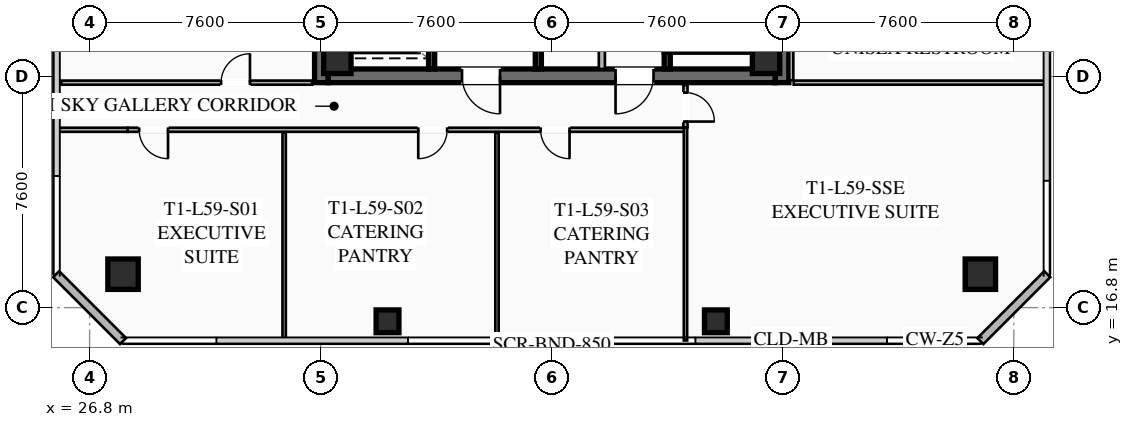
"""IFC4 building model, lengths in metres.
Left out: names, types, materials, properties, quantities, classifications, styles, units other than length and angle.
Written with IfcOpenShell. Run it as: python <this file> out.ifc"""

import sys

from ifc_helpers import new_model, si_unit, direction, frame, frame_2d, origin, origin_2d, place, context, subcontext, project, spatial, rectangle, hollow_rectangle, extrude, element, fill, save


model = new_model("IFC4")
c1 = context("Model", 3, precision=1e-05, world=origin(), true_north=direction((0.0, 1.0)))
c2 = subcontext(c1, "Body", "Model", "MODEL_VIEW")
j1 = project(units=[si_unit("LENGTHUNIT", "METRE"), si_unit("PLANEANGLEUNIT", "RADIAN")], contexts=[c1])
p1 = place(None, origin())
s1 = spatial("IfcSite", under=j1, at=p1, CompositionType="ELEMENT")
p2 = place(p1, origin())
s2 = spatial("IfcBuilding", under=s1, at=p2, CompositionType="ELEMENT")
p3 = place(p2, frame((0.0, 0.0, 218.4)))
s3 = spatial("IfcBuildingStorey", under=s2, at=p3, CompositionType="ELEMENT", Elevation=218.4)
for number, where, z_axis, x_axis in (
    (1, (34.425, 24.2, 0.0), (0.0, 0.0, 1.0), (0.0, 1.0, 0.0)),
    (2, (49.575, 39.8, 0.0), (0.0, 0.0, 1.0), (0.0, -1.0, 0.0)),
):
    element("IfcWall", number, at=place(p3, frame(where, z_axis=z_axis, x_axis=x_axis)), inside=s3, PredefinedType="SHEAR", context=c2, shape_type="SweptSolid", body=[
        extrude(rectangle(XDim=15.6, YDim=0.45, at=frame_2d((7.8, 0.0))), origin(), (0.0, 0.0, 1.0), 3.55),
    ])
p4 = place(p3, frame((49.35, 24.425, 0.0), z_axis=(0.0, 0.0, 1.0), x_axis=(-1.0, 0.0, 0.0)))
e3 = element("IfcWall", 3, at=p4, inside=s3, PredefinedType="SHEAR", context=c2, shape_type="SweptSolid", body=[
    extrude(rectangle(XDim=14.7, YDim=0.45, at=frame_2d((7.35, 0.0))), origin(), (0.0, 0.0, 1.0), 3.55),
])
p5 = place(p4, frame((9.05, 0.0, 0.0)))
e4 = element("IfcOpeningElement", 4, at=p5, cuts=e3, PredefinedType="OPENING", context=c2, shape_type="SweptSolid", body=[
    extrude(rectangle(XDim=1.25, YDim=2.25, at=frame_2d((0.625, 1.125))), frame((0.0, 0.235, 0.0), z_axis=(0.0, -1.0, 0.0), x_axis=(1.0, 0.0, 0.0)), (0.0, 0.0, 1.0), 0.47),
])
p6 = place(p4, frame((4.0, 0.0, 0.0)))
e5 = element("IfcOpeningElement", 5, at=p6, cuts=e3, PredefinedType="OPENING", context=c2, shape_type="SweptSolid", body=[
    extrude(rectangle(XDim=1.25, YDim=2.25, at=frame_2d((0.625, 1.125))), frame((0.0, 0.235, 0.0), z_axis=(0.0, -1.0, 0.0), x_axis=(1.0, 0.0, 0.0)), (0.0, 0.0, 1.0), 0.47),
])
for number, where, z_axis, x_axis in (
    (6, (34.95, 24.95, 0.0), (0.0, 0.0, 1.0), (1.0, 0.0, 0.0)),
    (7, (49.05, 24.95, 0.0), (0.0, 0.0, 1.0), (1.0, 0.0, 0.0)),
):
    element("IfcColumn", number, at=place(p3, frame(where, z_axis=z_axis, x_axis=x_axis)), inside=s3, PredefinedType="COLUMN", context=c2, shape_type="SweptSolid", body=[
        extrude(hollow_rectangle(XDim=0.9, YDim=0.9, WallThickness=0.04, at=origin_2d()), origin(), (0.0, 0.0, 1.0), 3.37),
    ])
for number, where, z_axis, x_axis in (
    (8, (27.9, 17.9, 0.0), (0.0, 0.0, 1.0), (1.0, 0.0, 0.0)),
    (9, (56.1, 17.9, 0.0), (0.0, 0.0, 1.0), (1.0, 0.0, 0.0)),
):
    element("IfcColumn", number, at=place(p3, frame(where, z_axis=z_axis, x_axis=x_axis)), inside=s3, PredefinedType="COLUMN", context=c2, shape_type="SweptSolid", body=[
        extrude(hollow_rectangle(XDim=1.0, YDim=1.0, WallThickness=0.04, at=origin_2d()), origin(), (0.0, 0.0, 1.0), 3.37),
    ])
for number, where, z_axis, x_axis in (
    (10, (36.6, 16.35, 0.0), (0.0, 0.0, 1.0), (1.0, 0.0, 0.0)),
    (11, (47.4, 16.35, 0.0), (0.0, 0.0, 1.0), (1.0, 0.0, 0.0)),
):
    element("IfcColumn", number, at=place(p3, frame(where, z_axis=z_axis, x_axis=x_axis)), inside=s3, PredefinedType="COLUMN", context=c2, shape_type="SweptSolid", body=[
        extrude(hollow_rectangle(XDim=0.75, YDim=0.75, WallThickness=0.032, at=origin_2d()), origin(), (0.0, 0.0, 1.0), 3.37),
    ])
for number, where, z_axis, x_axis in (
    (12, (27.9, 15.7, 0.0), (0.0, 0.0, 1.0), (-0.707, 0.707, 0.0)),
    (13, (58.3, 17.9, 0.0), (0.0, 0.0, 1.0), (-0.707, -0.707, 0.0)),
):
    element("IfcWall", number, at=place(p3, frame(where, z_axis=z_axis, x_axis=x_axis)), inside=s3, PredefinedType="SOLIDWALL", context=c2, shape_type="SweptSolid", body=[
        extrude(rectangle(XDim=3.111, YDim=0.28, at=frame_2d((1.556, 0.0))), origin(), (0.0, 0.0, 1.0), 3.37),
    ])
p7 = place(p3, frame((45.8, 32.8, 0.0), z_axis=(0.0, 0.0, 1.0), x_axis=(0.0, -1.0, 0.0)))
e14 = element("IfcWall", 14, at=p7, inside=s3, PredefinedType="SHEAR", context=c2, shape_type="SweptSolid", body=[
    extrude(rectangle(XDim=8.15, YDim=0.2, at=frame_2d((4.075, 0.0))), origin(), (0.0, 0.0, 1.0), 3.37),
])
p8 = place(p7, frame((0.45, 0.0, 0.0)))
e15 = element("IfcOpeningElement", 15, at=p8, cuts=e14, PredefinedType="OPENING", context=c2, shape_type="SweptSolid", body=[
    extrude(rectangle(XDim=1.15, YDim=2.2, at=frame_2d((0.575, 1.1))), frame((0.0, 0.11, 0.0), z_axis=(0.0, -1.0, 0.0), x_axis=(1.0, 0.0, 0.0)), (0.0, 0.0, 1.0), 0.22),
])
p9 = place(p3, frame((41.56, 24.65, 0.0), z_axis=(0.0, 0.0, 1.0), x_axis=(0.0, 1.0, 0.0)))
e16 = element("IfcWall", 16, at=p9, inside=s3, PredefinedType="SHEAR", context=c2, shape_type="SweptSolid", body=[
    extrude(rectangle(XDim=14.7, YDim=0.2, at=frame_2d((7.35, 0.0))), origin(), (0.0, 0.0, 1.0), 3.37),
])
p10 = place(p3, frame((38.05, 24.65, 0.0), z_axis=(0.0, 0.0, 1.0), x_axis=(0.0, 1.0, 0.0)))
e17 = element("IfcWall", 17, at=p10, inside=s3, PredefinedType="SHEAR", context=c2, shape_type="SweptSolid", body=[
    extrude(rectangle(XDim=6.55, YDim=0.2, at=frame_2d((3.275, 0.0))), origin(), (0.0, 0.0, 1.0), 3.37),
])
p11 = place(p10, frame((4.975, 0.0, 0.0)))
e18 = element("IfcOpeningElement", 18, at=p11, cuts=e17, PredefinedType="OPENING", context=c2, shape_type="SweptSolid", body=[
    extrude(rectangle(XDim=1.3, YDim=2.25, at=frame_2d((0.65, 1.125))), frame((0.0, 0.11, 0.0), z_axis=(0.0, -1.0, 0.0), x_axis=(1.0, 0.0, 0.0)), (0.0, 0.0, 1.0), 0.22),
])
p12 = place(p10, frame((2.975, 0.0, 0.0)))
e19 = element("IfcOpeningElement", 19, at=p12, cuts=e17, PredefinedType="OPENING", context=c2, shape_type="SweptSolid", body=[
    extrude(rectangle(XDim=1.3, YDim=2.25, at=frame_2d((0.65, 1.125))), frame((0.0, 0.11, 0.0), z_axis=(0.0, -1.0, 0.0), x_axis=(1.0, 0.0, 0.0)), (0.0, 0.0, 1.0), 0.22),
])
p13 = place(p10, frame((0.775, 0.0, 0.0)))
e20 = element("IfcOpeningElement", 20, at=p13, cuts=e17, PredefinedType="OPENING", context=c2, shape_type="SweptSolid", body=[
    extrude(rectangle(XDim=1.3, YDim=2.25, at=frame_2d((0.65, 1.125))), frame((0.0, 0.11, 0.0), z_axis=(0.0, -1.0, 0.0), x_axis=(1.0, 0.0, 0.0)), (0.0, 0.0, 1.0), 0.22),
])
p14 = place(p3, frame((43.65, 24.65, 0.0), z_axis=(0.0, 0.0, 1.0), x_axis=(0.0, 1.0, 0.0)))
e21 = element("IfcWall", 21, at=p14, inside=s3, PredefinedType="SOLIDWALL", context=c2, shape_type="SweptSolid", body=[
    extrude(rectangle(XDim=7.0, YDim=0.2, at=frame_2d((3.5, 0.0))), origin(), (0.0, 0.0, 1.0), 2.723),
])
p15 = place(p14, frame((0.85, 0.0, 0.0)))
e22 = element("IfcOpeningElement", 22, at=p15, cuts=e21, PredefinedType="OPENING", context=c2, shape_type="SweptSolid", body=[
    extrude(rectangle(XDim=0.95, YDim=2.05, at=frame_2d((0.475, 1.025))), frame((0.0, 0.11, 0.0), z_axis=(0.0, -1.0, 0.0), x_axis=(1.0, 0.0, 0.0)), (0.0, 0.0, 1.0), 0.22),
])
p16 = place(p14, frame((4.8, 0.0, 0.0)))
e23 = element("IfcOpeningElement", 23, at=p16, cuts=e21, PredefinedType="OPENING", context=c2, shape_type="SweptSolid", body=[
    extrude(rectangle(XDim=1.05, YDim=2.2, at=frame_2d((0.525, 1.1))), frame((0.0, 0.11, 0.0), z_axis=(0.0, -1.0, 0.0), x_axis=(1.0, 0.0, 0.0)), (0.0, 0.0, 1.0), 0.22),
])
p17 = place(p3, frame((46.4, 22.65, 0.0), z_axis=(0.0, 0.0, 1.0), x_axis=(-1.0, 0.0, 0.0)))
e24 = element("IfcWall", 24, at=p17, inside=s3, PredefinedType="PARTITIONING", context=c2, shape_type="SweptSolid", body=[
    extrude(rectangle(XDim=18.35, YDim=0.135, at=frame_2d((9.175, 0.0))), origin(), (0.0, 0.0, 1.0), 2.723),
])
p18 = place(p17, frame((17.02, 0.0, 0.0)))
e25 = element("IfcOpeningElement", 25, at=p18, cuts=e24, PredefinedType="OPENING", context=c2, shape_type="SweptSolid", body=[
    extrude(rectangle(XDim=0.95, YDim=2.05, at=frame_2d((0.475, 1.025))), frame((0.0, 0.077, 0.0), z_axis=(0.0, -1.0, 0.0), x_axis=(1.0, 0.0, 0.0)), (0.0, 0.0, 1.0), 0.155),
])
p19 = place(p17, frame((7.84, 0.0, 0.0)))
e26 = element("IfcOpeningElement", 26, at=p19, cuts=e24, PredefinedType="OPENING", context=c2, shape_type="SweptSolid", body=[
    extrude(rectangle(XDim=0.95, YDim=2.05, at=frame_2d((0.475, 1.025))), frame((0.0, 0.077, 0.0), z_axis=(0.0, -1.0, 0.0), x_axis=(1.0, 0.0, 0.0)), (0.0, 0.0, 1.0), 0.155),
])
p20 = place(p17, frame((3.813, 0.0, 0.0)))
e27 = element("IfcOpeningElement", 27, at=p20, cuts=e24, PredefinedType="OPENING", context=c2, shape_type="SweptSolid", body=[
    extrude(rectangle(XDim=0.95, YDim=2.05, at=frame_2d((0.475, 1.025))), frame((0.0, 0.077, 0.0), z_axis=(0.0, -1.0, 0.0), x_axis=(1.0, 0.0, 0.0)), (0.0, 0.0, 1.0), 0.155),
])
p21 = place(p3, frame((25.72, 22.65, 0.0), z_axis=(0.0, 0.0, 1.0), x_axis=(1.0, 0.0, 0.0)))
e28 = element("IfcWall", 28, at=p21, inside=s3, PredefinedType="PARTITIONING", context=c2, shape_type="SweptSolid", body=[
    extrude(rectangle(XDim=2.33, YDim=0.135, at=frame_2d((1.165, 0.0))), origin(), (0.0, 0.0, 1.0), 2.723),
])
p22 = place(p3, frame((46.4, 24.12, 0.0), z_axis=(0.0, 0.0, 1.0), x_axis=(0.0, -1.0, 0.0)))
e29 = element("IfcWall", 29, at=p22, inside=s3, PredefinedType="PARTITIONING", context=c2, shape_type="SweptSolid", body=[
    extrude(rectangle(XDim=1.39, YDim=0.135, at=frame_2d((0.695, 0.0))), origin(), (0.0, 0.0, 1.0), 2.723),
])
p23 = place(p22, frame((0.25, 0.0, 0.0)))
e30 = element("IfcOpeningElement", 30, at=p23, cuts=e29, PredefinedType="OPENING", context=c2, shape_type="SweptSolid", body=[
    extrude(rectangle(XDim=0.95, YDim=2.05, at=frame_2d((0.475, 1.025))), frame((0.0, 0.077, 0.0), z_axis=(0.0, -1.0, 0.0), x_axis=(1.0, 0.0, 0.0)), (0.0, 0.0, 1.0), 0.155),
])
for number, where, z_axis, x_axis in (
    (31, (33.2, 15.72, 0.0), (0.0, 0.0, 1.0), (0.0, 1.0, 0.0)),
    (32, (40.2, 15.72, 0.0), (0.0, 0.0, 1.0), (0.0, 1.0, 0.0)),
):
    element("IfcWall", number, at=place(p3, frame(where, z_axis=z_axis, x_axis=x_axis)), inside=s3, PredefinedType="PARTITIONING", context=c2, shape_type="SweptSolid", body=[
        extrude(rectangle(XDim=6.85, YDim=0.11, at=frame_2d((3.425, 0.0))), origin(), (0.0, 0.0, 1.0), 2.723),
    ])
p24 = place(p3, frame((46.4, 15.72, 0.0), z_axis=(0.0, 0.0, 1.0), x_axis=(0.0, 1.0, 0.0)))
e33 = element("IfcWall", 33, at=p24, inside=s3, PredefinedType="PARTITIONING", context=c2, shape_type="SweptSolid", body=[
    extrude(rectangle(XDim=7.01, YDim=0.11, at=frame_2d((3.505, 0.0))), origin(), (0.0, 0.0, 1.0), 2.723),
])
p25 = place(p3, frame((49.88, 39.72, 0.0), z_axis=(0.0, 0.0, 1.0), x_axis=(0.0, -1.0, 0.0)))
e34 = element("IfcWall", 34, at=p25, inside=s3, PredefinedType="PARTITIONING", context=c2, shape_type="SweptSolid", body=[
    extrude(rectangle(XDim=15.44, YDim=0.135, at=frame_2d((7.72, 0.0))), origin(), (0.0, 0.0, 1.0), 2.723),
])
p26 = place(p3, frame((49.96, 24.2, 0.0), z_axis=(0.0, 0.0, 1.0), x_axis=(1.0, 0.0, 0.0)))
e35 = element("IfcWall", 35, at=p26, inside=s3, PredefinedType="PARTITIONING", context=c2, shape_type="SweptSolid", body=[
    extrude(rectangle(XDim=8.32, YDim=0.135, at=frame_2d((4.16, 0.0))), origin(), (0.0, 0.0, 1.0), 2.723),
])
p27 = place(p3, frame((25.87, 24.2, 0.0), z_axis=(0.0, 0.0, 1.0), x_axis=(1.0, 0.0, 0.0)))
e36 = element("IfcWall", 36, at=p27, inside=s3, PredefinedType="PARTITIONING", context=c2, shape_type="SweptSolid", body=[
    extrude(rectangle(XDim=8.25, YDim=0.135, at=frame_2d((4.125, 0.0))), origin(), (0.0, 0.0, 1.0), 2.723),
])
p28 = place(p27, frame((5.255, 0.0, 0.0)))
e37 = element("IfcOpeningElement", 37, at=p28, cuts=e36, PredefinedType="OPENING", context=c2, shape_type="SweptSolid", body=[
    extrude(rectangle(XDim=0.95, YDim=2.05, at=frame_2d((0.475, 1.025))), frame((0.0, 0.077, 0.0), z_axis=(0.0, -1.0, 0.0), x_axis=(1.0, 0.0, 0.0)), (0.0, 0.0, 1.0), 0.155),
])
p29 = place(p5, origin())
e38 = element("IfcDoor", 38, at=p29, inside=s3, OperationType="SINGLE_SWING_LEFT", PredefinedType="DOOR", context=c2, shape_type="SweptSolid", body=[
    extrude(rectangle(XDim=1.25, YDim=2.25, at=frame_2d((0.625, 1.125))), frame((0.0, 0.025, 0.0), z_axis=(0.0, -1.0, 0.0), x_axis=(1.0, 0.0, 0.0)), (0.0, 0.0, 1.0), 0.05),
])
fill(e4, e38)
p30 = place(p6, origin())
e39 = element("IfcDoor", 39, at=p30, inside=s3, OperationType="SINGLE_SWING_RIGHT", PredefinedType="DOOR", context=c2, shape_type="SweptSolid", body=[
    extrude(rectangle(XDim=1.25, YDim=2.25, at=frame_2d((0.625, 1.125))), frame((0.0, 0.025, 0.0), z_axis=(0.0, -1.0, 0.0), x_axis=(1.0, 0.0, 0.0)), (0.0, 0.0, 1.0), 0.05),
])
fill(e5, e39)
p31 = place(p18, origin())
e40 = element("IfcDoor", 40, at=p31, inside=s3, OperationType="SINGLE_SWING_LEFT", PredefinedType="DOOR", context=c2, shape_type="SweptSolid", body=[
    extrude(rectangle(XDim=0.95, YDim=2.05, at=frame_2d((0.475, 1.025))), frame((0.0, 0.025, 0.0), z_axis=(0.0, -1.0, 0.0), x_axis=(1.0, 0.0, 0.0)), (0.0, 0.0, 1.0), 0.05),
])
fill(e25, e40)
p32 = place(p19, origin())
e41 = element("IfcDoor", 41, at=p32, inside=s3, OperationType="SINGLE_SWING_RIGHT", PredefinedType="DOOR", context=c2, shape_type="SweptSolid", body=[
    extrude(rectangle(XDim=0.95, YDim=2.05, at=frame_2d((0.475, 1.025))), frame((0.0, 0.025, 0.0), z_axis=(0.0, -1.0, 0.0), x_axis=(1.0, 0.0, 0.0)), (0.0, 0.0, 1.0), 0.05),
])
fill(e26, e41)
p33 = place(p20, origin())
e42 = element("IfcDoor", 42, at=p33, inside=s3, OperationType="SINGLE_SWING_LEFT", PredefinedType="DOOR", context=c2, shape_type="SweptSolid", body=[
    extrude(rectangle(XDim=0.95, YDim=2.05, at=frame_2d((0.475, 1.025))), frame((0.0, 0.025, 0.0), z_axis=(0.0, -1.0, 0.0), x_axis=(1.0, 0.0, 0.0)), (0.0, 0.0, 1.0), 0.05),
])
fill(e27, e42)
p34 = place(p23, origin())
e43 = element("IfcDoor", 43, at=p34, inside=s3, OperationType="SINGLE_SWING_RIGHT", PredefinedType="DOOR", context=c2, shape_type="SweptSolid", body=[
    extrude(rectangle(XDim=0.95, YDim=2.05, at=frame_2d((0.475, 1.025))), frame((0.0, 0.025, 0.0), z_axis=(0.0, -1.0, 0.0), x_axis=(1.0, 0.0, 0.0)), (0.0, 0.0, 1.0), 0.05),
])
fill(e30, e43)
p35 = place(p28, origin())
e44 = element("IfcDoor", 44, at=p35, inside=s3, OperationType="SINGLE_SWING_RIGHT", PredefinedType="DOOR", context=c2, shape_type="SweptSolid", body=[
    extrude(rectangle(XDim=0.95, YDim=2.05, at=frame_2d((0.475, 1.025))), frame((0.0, 0.025, 0.0), z_axis=(0.0, -1.0, 0.0), x_axis=(1.0, 0.0, 0.0)), (0.0, 0.0, 1.0), 0.05),
])
fill(e37, e44)
save(model, sys.argv[1])
